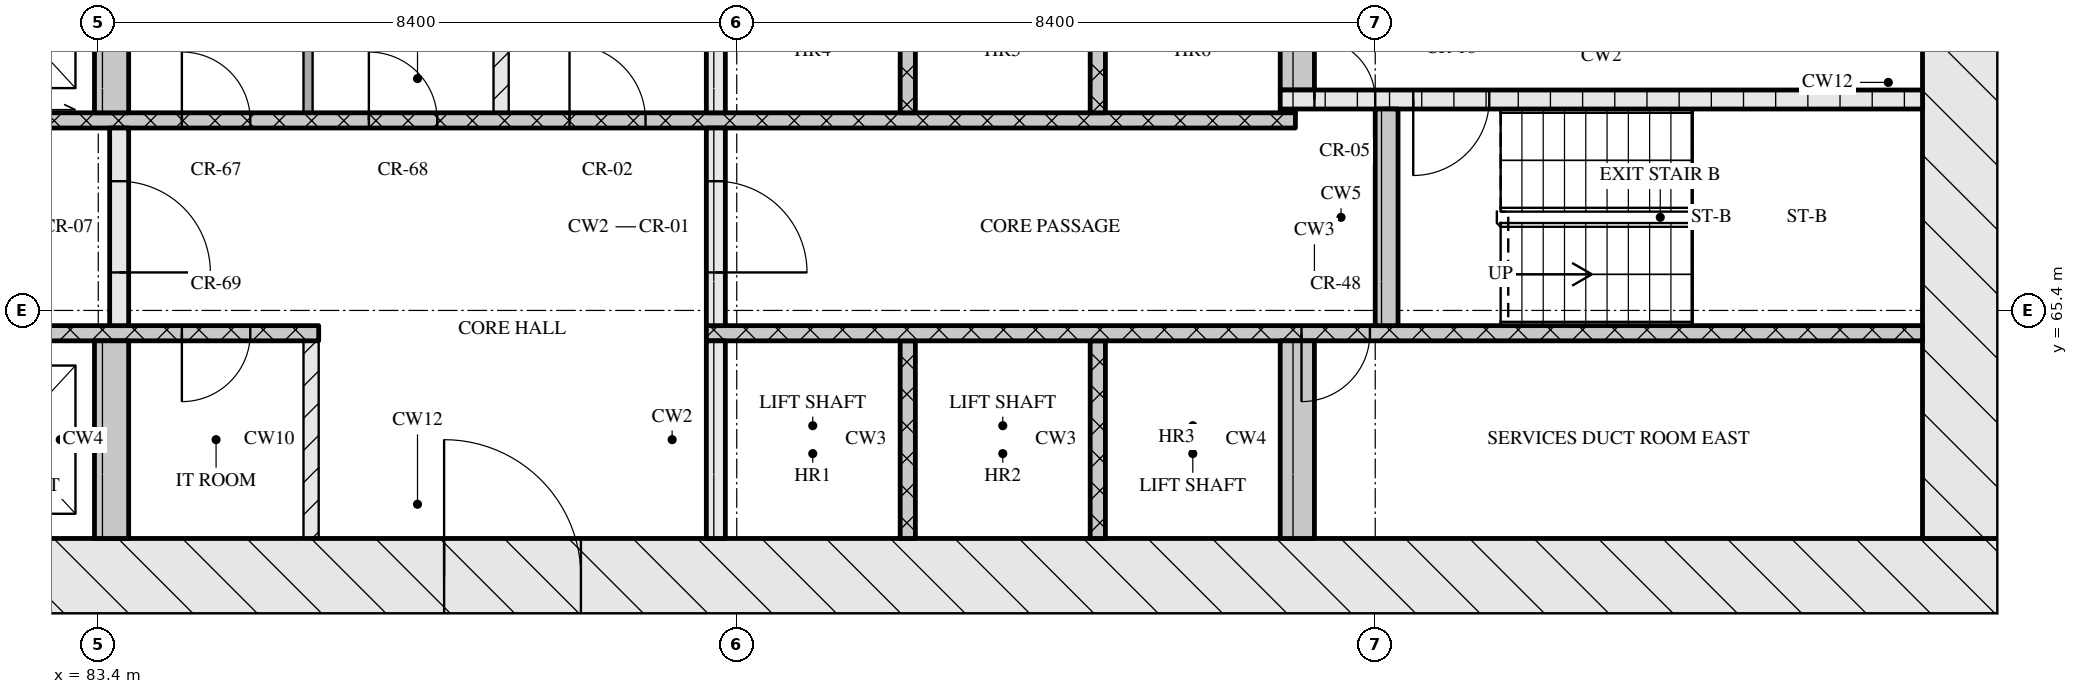
"""IFC4 building model, lengths in metres.
Left out: names, types, materials, properties, quantities, classifications, styles, units other than length and angle.
Written with IfcOpenShell. Run it as: python <this file> out.ifc"""

import sys

from ifc_helpers import new_model, si_unit, direction, frame, frame_2d, origin, place, context, subcontext, project, spatial, rectangle, extrude, element, fill, save


model = new_model("IFC4")
c1 = context("Model", 3, precision=1e-05, world=origin(), true_north=direction((0.0, 1.0)))
c2 = subcontext(c1, "Body", "Model", "MODEL_VIEW")
j1 = project(units=[si_unit("LENGTHUNIT", "METRE"), si_unit("PLANEANGLEUNIT", "RADIAN")], contexts=[c1])
p1 = place(None, origin())
s1 = spatial("IfcSite", under=j1, at=p1, CompositionType="ELEMENT")
p2 = place(p1, origin())
s2 = spatial("IfcBuilding", under=s1, at=p2, CompositionType="ELEMENT")
p3 = place(p2, frame((0.0, 0.0, 98.85)))
s3 = spatial("IfcBuildingStorey", under=s2, at=p3, CompositionType="ELEMENT", Elevation=98.85)
p4 = place(p3, frame((66.8, 61.9, 0.0), z_axis=(0.0, 0.0, 1.0), x_axis=(1.0, 0.0, 0.0)))
e1 = element("IfcWall", 1, at=p4, inside=s3, PredefinedType="SOLIDWALL", context=c2, shape_type="SweptSolid", body=[
    extrude(rectangle(XDim=41.6, YDim=1.0, at=frame_2d((20.8, 0.0))), origin(), (0.0, 0.0, 1.0), 3.32),
])
p5 = place(p4, frame((21.15, 0.0, 0.0)))
e2 = element("IfcOpeningElement", 2, at=p5, cuts=e1, PredefinedType="OPENING", context=c2, shape_type="SweptSolid", body=[
    extrude(rectangle(XDim=1.8, YDim=2.1, at=frame_2d((0.9, 1.05))), frame((0.0, 0.51, 0.0), z_axis=(0.0, -1.0, 0.0), x_axis=(1.0, 0.0, 0.0)), (0.0, 0.0, 1.0), 1.02),
])
p6 = place(p3, frame((107.9, 62.4, 0.0), z_axis=(0.0, 0.0, 1.0), x_axis=(0.0, 1.0, 0.0)))
e3 = element("IfcWall", 3, at=p6, inside=s3, PredefinedType="SOLIDWALL", context=c2, shape_type="SweptSolid", body=[
    extrude(rectangle(XDim=12.0, YDim=1.0, at=frame_2d((6.0, 0.0))), origin(), (0.0, 0.0, 1.0), 3.32),
])
p7 = place(p6, frame((6.45, 0.0, 0.0)))
e4 = element("IfcOpeningElement", 4, at=p7, cuts=e3, PredefinedType="OPENING", context=c2, shape_type="SweptSolid", body=[
    extrude(rectangle(XDim=1.2, YDim=2.1, at=frame_2d((0.6, 1.05))), frame((0.0, 0.51, 0.0), z_axis=(0.0, -1.0, 0.0), x_axis=(1.0, 0.0, 0.0)), (0.0, 0.0, 1.0), 1.02),
])
p8 = place(p3, frame((83.575, 62.4, 0.0), z_axis=(0.0, 0.0, 1.0), x_axis=(0.0, 1.0, 0.0)))
e5 = element("IfcWall", 5, at=p8, inside=s3, PredefinedType="SOLIDWALL", context=c2, shape_type="SweptSolid", body=[
    extrude(rectangle(XDim=2.6, YDim=0.45, at=frame_2d((1.3, 0.0))), origin(), (0.0, 0.0, 1.0), 3.32),
])
p9 = place(p3, frame((86.2, 62.4, 0.0), z_axis=(0.0, 0.0, 1.0), x_axis=(0.0, 1.0, 0.0)))
e6 = element("IfcWall", 6, at=p9, inside=s3, PredefinedType="PARTITIONING", context=c2, shape_type="SweptSolid", body=[
    extrude(rectangle(XDim=2.6, YDim=0.2, at=frame_2d((1.3, 0.0))), origin(), (0.0, 0.0, 1.0), 3.32),
])
p10 = place(p3, frame((91.525, 62.4, 0.0), z_axis=(0.0, 0.0, 1.0), x_axis=(0.0, 1.0, 0.0)))
e7 = element("IfcWall", 7, at=p10, inside=s3, PredefinedType="SOLIDWALL", context=c2, shape_type="SweptSolid", body=[
    extrude(rectangle(XDim=2.6, YDim=0.25, at=frame_2d((1.3, 0.0))), origin(), (0.0, 0.0, 1.0), 3.32),
])
for number, where, z_axis, x_axis in (
    (8, (94.05, 62.4, 0.0), (0.0, 0.0, 1.0), (0.0, 1.0, 0.0)),
    (9, (96.55, 62.4, 0.0), (0.0, 0.0, 1.0), (0.0, 1.0, 0.0)),
):
    element("IfcWall", number, at=place(p3, frame(where, z_axis=z_axis, x_axis=x_axis)), inside=s3, PredefinedType="SOLIDWALL", context=c2, shape_type="SweptSolid", body=[
        extrude(rectangle(XDim=2.6, YDim=0.2, at=frame_2d((1.3, 0.0))), origin(), (0.0, 0.0, 1.0), 3.32),
    ])
p11 = place(p3, frame((99.175, 62.4, 0.0), z_axis=(0.0, 0.0, 1.0), x_axis=(0.0, 1.0, 0.0)))
e10 = element("IfcWall", 10, at=p11, inside=s3, PredefinedType="SOLIDWALL", context=c2, shape_type="SweptSolid", body=[
    extrude(rectangle(XDim=2.6, YDim=0.45, at=frame_2d((1.3, 0.0))), origin(), (0.0, 0.0, 1.0), 3.32),
])
p12 = place(p3, frame((67.8, 65.1, 0.0), z_axis=(0.0, 0.0, 1.0), x_axis=(1.0, 0.0, 0.0)))
e11 = element("IfcWall", 11, at=p12, inside=s3, PredefinedType="SOLIDWALL", context=c2, shape_type="SweptSolid", body=[
    extrude(rectangle(XDim=18.5, YDim=0.2, at=frame_2d((9.25, 0.0))), origin(), (0.0, 0.0, 1.0), 3.32),
])
p13 = place(p12, frame((7.27, 0.0, 0.0)))
e12 = element("IfcOpeningElement", 12, at=p13, cuts=e11, PredefinedType="OPENING", context=c2, shape_type="SweptSolid", body=[
    extrude(rectangle(XDim=0.9, YDim=2.1, at=frame_2d((0.45, 1.05))), frame((0.0, 0.11, 0.0), z_axis=(0.0, -1.0, 0.0), x_axis=(1.0, 0.0, 0.0)), (0.0, 0.0, 1.0), 0.22),
])
p14 = place(p12, frame((8.85, 0.0, 0.0)))
e13 = element("IfcOpeningElement", 13, at=p14, cuts=e11, PredefinedType="OPENING", context=c2, shape_type="SweptSolid", body=[
    extrude(rectangle(XDim=1.1, YDim=2.1, at=frame_2d((0.55, 1.05))), frame((0.0, 0.11, 0.0), z_axis=(0.0, -1.0, 0.0), x_axis=(1.0, 0.0, 0.0)), (0.0, 0.0, 1.0), 0.22),
])
p15 = place(p12, frame((11.35, 0.0, 0.0)))
e14 = element("IfcOpeningElement", 14, at=p15, cuts=e11, PredefinedType="OPENING", context=c2, shape_type="SweptSolid", body=[
    extrude(rectangle(XDim=1.1, YDim=2.1, at=frame_2d((0.55, 1.05))), frame((0.0, 0.11, 0.0), z_axis=(0.0, -1.0, 0.0), x_axis=(1.0, 0.0, 0.0)), (0.0, 0.0, 1.0), 0.22),
])
p16 = place(p12, frame((13.85, 0.0, 0.0)))
e15 = element("IfcOpeningElement", 15, at=p16, cuts=e11, PredefinedType="OPENING", context=c2, shape_type="SweptSolid", body=[
    extrude(rectangle(XDim=1.1, YDim=2.1, at=frame_2d((0.55, 1.05))), frame((0.0, 0.11, 0.0), z_axis=(0.0, -1.0, 0.0), x_axis=(1.0, 0.0, 0.0)), (0.0, 0.0, 1.0), 0.22),
])
p17 = place(p12, frame((16.7, 0.0, 0.0)))
e16 = element("IfcOpeningElement", 16, at=p17, cuts=e11, PredefinedType="OPENING", context=c2, shape_type="SweptSolid", body=[
    extrude(rectangle(XDim=0.9, YDim=2.1, at=frame_2d((0.45, 1.05))), frame((0.0, 0.11, 0.0), z_axis=(0.0, -1.0, 0.0), x_axis=(1.0, 0.0, 0.0)), (0.0, 0.0, 1.0), 0.22),
])
p18 = place(p3, frame((91.4, 65.1, 0.0), z_axis=(0.0, 0.0, 1.0), x_axis=(1.0, 0.0, 0.0)))
e17 = element("IfcWall", 17, at=p18, inside=s3, PredefinedType="SOLIDWALL", context=c2, shape_type="SweptSolid", body=[
    extrude(rectangle(XDim=16.0, YDim=0.2, at=frame_2d((8.0, 0.0))), origin(), (0.0, 0.0, 1.0), 3.32),
])
p19 = place(p18, frame((7.83, 0.0, 0.0)))
e18 = element("IfcOpeningElement", 18, at=p19, cuts=e17, PredefinedType="OPENING", context=c2, shape_type="SweptSolid", body=[
    extrude(rectangle(XDim=0.9, YDim=2.1, at=frame_2d((0.45, 1.05))), frame((0.0, 0.11, 0.0), z_axis=(0.0, -1.0, 0.0), x_axis=(1.0, 0.0, 0.0)), (0.0, 0.0, 1.0), 0.22),
])
p20 = place(p3, frame((83.675, 65.2, 0.0), z_axis=(0.0, 0.0, 1.0), x_axis=(0.0, 1.0, 0.0)))
e19 = element("IfcWall", 19, at=p20, inside=s3, PredefinedType="SOLIDWALL", context=c2, shape_type="SweptSolid", body=[
    extrude(rectangle(XDim=2.6, YDim=0.25, at=frame_2d((1.3, 0.0))), origin(), (0.0, 0.0, 1.0), 3.32),
])
p21 = place(p20, frame((0.7, 0.0, 0.0)))
e20 = element("IfcOpeningElement", 20, at=p21, cuts=e19, PredefinedType="OPENING", context=c2, shape_type="SweptSolid", body=[
    extrude(rectangle(XDim=1.2, YDim=2.1, at=frame_2d((0.6, 1.05))), frame((0.0, 0.135, 0.0), z_axis=(0.0, -1.0, 0.0), x_axis=(1.0, 0.0, 0.0)), (0.0, 0.0, 1.0), 0.27),
])
p22 = place(p3, frame((91.525, 65.2, 0.0), z_axis=(0.0, 0.0, 1.0), x_axis=(0.0, 1.0, 0.0)))
e21 = element("IfcWall", 21, at=p22, inside=s3, PredefinedType="SOLIDWALL", context=c2, shape_type="SweptSolid", body=[
    extrude(rectangle(XDim=2.6, YDim=0.25, at=frame_2d((1.3, 0.0))), origin(), (0.0, 0.0, 1.0), 3.32),
])
p23 = place(p22, frame((0.7, 0.0, 0.0)))
e22 = element("IfcOpeningElement", 22, at=p23, cuts=e21, PredefinedType="OPENING", context=c2, shape_type="SweptSolid", body=[
    extrude(rectangle(XDim=1.2, YDim=2.1, at=frame_2d((0.6, 1.05))), frame((0.0, 0.135, 0.0), z_axis=(0.0, -1.0, 0.0), x_axis=(1.0, 0.0, 0.0)), (0.0, 0.0, 1.0), 0.27),
])
p24 = place(p3, frame((100.35, 65.2, 0.0), z_axis=(0.0, 0.0, 1.0), x_axis=(0.0, 1.0, 0.0)))
e23 = element("IfcWall", 23, at=p24, inside=s3, PredefinedType="SOLIDWALL", context=c2, shape_type="SweptSolid", body=[
    extrude(rectangle(XDim=2.85, YDim=0.3, at=frame_2d((1.425, 0.0))), origin(), (0.0, 0.0, 1.0), 3.32),
])
p25 = place(p3, frame((76.05, 67.9, 0.0), z_axis=(0.0, 0.0, 1.0), x_axis=(1.0, 0.0, 0.0)))
e24 = element("IfcWall", 24, at=p25, inside=s3, PredefinedType="SOLIDWALL", context=c2, shape_type="SweptSolid", body=[
    extrude(rectangle(XDim=23.1, YDim=0.2, at=frame_2d((11.55, 0.0))), origin(), (0.0, 0.0, 1.0), 3.32),
])
p26 = place(p25, frame((0.6, 0.0, 0.0)))
e25 = element("IfcOpeningElement", 25, at=p26, cuts=e24, PredefinedType="OPENING", context=c2, shape_type="SweptSolid", body=[
    extrude(rectangle(XDim=1.1, YDim=2.1, at=frame_2d((0.55, 1.05))), frame((0.0, 0.11, 0.0), z_axis=(0.0, -1.0, 0.0), x_axis=(1.0, 0.0, 0.0)), (0.0, 0.0, 1.0), 0.22),
])
p27 = place(p25, frame((3.1, 0.0, 0.0)))
e26 = element("IfcOpeningElement", 26, at=p27, cuts=e24, PredefinedType="OPENING", context=c2, shape_type="SweptSolid", body=[
    extrude(rectangle(XDim=1.1, YDim=2.1, at=frame_2d((0.55, 1.05))), frame((0.0, 0.11, 0.0), z_axis=(0.0, -1.0, 0.0), x_axis=(1.0, 0.0, 0.0)), (0.0, 0.0, 1.0), 0.22),
])
p28 = place(p25, frame((5.6, 0.0, 0.0)))
e27 = element("IfcOpeningElement", 27, at=p28, cuts=e24, PredefinedType="OPENING", context=c2, shape_type="SweptSolid", body=[
    extrude(rectangle(XDim=1.1, YDim=2.1, at=frame_2d((0.55, 1.05))), frame((0.0, 0.11, 0.0), z_axis=(0.0, -1.0, 0.0), x_axis=(1.0, 0.0, 0.0)), (0.0, 0.0, 1.0), 0.22),
])
p29 = place(p25, frame((8.45, 0.0, 0.0)))
e28 = element("IfcOpeningElement", 28, at=p29, cuts=e24, PredefinedType="OPENING", context=c2, shape_type="SweptSolid", body=[
    extrude(rectangle(XDim=0.9, YDim=2.1, at=frame_2d((0.45, 1.05))), frame((0.0, 0.11, 0.0), z_axis=(0.0, -1.0, 0.0), x_axis=(1.0, 0.0, 0.0)), (0.0, 0.0, 1.0), 0.22),
])
p30 = place(p25, frame((10.91, 0.0, 0.0)))
e29 = element("IfcOpeningElement", 29, at=p30, cuts=e24, PredefinedType="OPENING", context=c2, shape_type="SweptSolid", body=[
    extrude(rectangle(XDim=0.9, YDim=2.1, at=frame_2d((0.45, 1.05))), frame((0.0, 0.11, 0.0), z_axis=(0.0, -1.0, 0.0), x_axis=(1.0, 0.0, 0.0)), (0.0, 0.0, 1.0), 0.22),
])
p31 = place(p25, frame((13.55, 0.0, 0.0)))
e30 = element("IfcOpeningElement", 30, at=p31, cuts=e24, PredefinedType="OPENING", context=c2, shape_type="SweptSolid", body=[
    extrude(rectangle(XDim=1.0, YDim=2.1, at=frame_2d((0.5, 1.05))), frame((0.0, 0.11, 0.0), z_axis=(0.0, -1.0, 0.0), x_axis=(1.0, 0.0, 0.0)), (0.0, 0.0, 1.0), 0.22),
])
p32 = place(p3, frame((83.575, 68.0, 0.0), z_axis=(0.0, 0.0, 1.0), x_axis=(0.0, 1.0, 0.0)))
e31 = element("IfcWall", 31, at=p32, inside=s3, PredefinedType="SOLIDWALL", context=c2, shape_type="SweptSolid", body=[
    extrude(rectangle(XDim=2.6, YDim=0.45, at=frame_2d((1.3, 0.0))), origin(), (0.0, 0.0, 1.0), 3.32),
])
p33 = place(p3, frame((86.16, 68.0, 0.0), z_axis=(0.0, 0.0, 1.0), x_axis=(0.0, 1.0, 0.0)))
e32 = element("IfcWall", 32, at=p33, inside=s3, PredefinedType="PARTITIONING", context=c2, shape_type="SweptSolid", body=[
    extrude(rectangle(XDim=2.6, YDim=0.12, at=frame_2d((1.3, 0.0))), origin(), (0.0, 0.0, 1.0), 3.32),
])
p34 = place(p3, frame((88.7, 68.0, 0.0), z_axis=(0.0, 0.0, 1.0), x_axis=(0.0, 1.0, 0.0)))
e33 = element("IfcWall", 33, at=p34, inside=s3, PredefinedType="PARTITIONING", context=c2, shape_type="SweptSolid", body=[
    extrude(rectangle(XDim=2.6, YDim=0.2, at=frame_2d((1.3, 0.0))), origin(), (0.0, 0.0, 1.0), 3.32),
])
p35 = place(p3, frame((91.525, 68.0, 0.0), z_axis=(0.0, 0.0, 1.0), x_axis=(0.0, 1.0, 0.0)))
e34 = element("IfcWall", 34, at=p35, inside=s3, PredefinedType="SOLIDWALL", context=c2, shape_type="SweptSolid", body=[
    extrude(rectangle(XDim=2.6, YDim=0.25, at=frame_2d((1.3, 0.0))), origin(), (0.0, 0.0, 1.0), 3.32),
])
for number, where, z_axis, x_axis in (
    (35, (94.05, 68.0, 0.0), (0.0, 0.0, 1.0), (0.0, 1.0, 0.0)),
    (36, (96.55, 68.0, 0.0), (0.0, 0.0, 1.0), (0.0, 1.0, 0.0)),
):
    element("IfcWall", number, at=place(p3, frame(where, z_axis=z_axis, x_axis=x_axis)), inside=s3, PredefinedType="SOLIDWALL", context=c2, shape_type="SweptSolid", body=[
        extrude(rectangle(XDim=2.6, YDim=0.2, at=frame_2d((1.3, 0.0))), origin(), (0.0, 0.0, 1.0), 3.32),
    ])
p36 = place(p3, frame((98.95, 68.025, 0.0), z_axis=(0.0, 0.0, 1.0), x_axis=(1.0, 0.0, 0.0)))
e37 = element("IfcWall", 37, at=p36, inside=s3, PredefinedType="SOLIDWALL", context=c2, shape_type="SweptSolid", body=[
    extrude(rectangle(XDim=0.2, YDim=0.05, at=frame_2d((0.1, 0.0))), origin(), (0.0, 0.0, 1.0), 3.32),
])
p37 = place(p3, frame((98.95, 68.175, 0.0), z_axis=(0.0, 0.0, 1.0), x_axis=(1.0, 0.0, 0.0)))
e38 = element("IfcWall", 38, at=p37, inside=s3, PredefinedType="SOLIDWALL", context=c2, shape_type="SweptSolid", body=[
    extrude(rectangle(XDim=8.45, YDim=0.25, at=frame_2d((4.225, 0.0))), origin(), (0.0, 0.0, 1.0), 3.32),
])
p38 = place(p37, frame((0.45, 0.0, 0.0)))
e39 = element("IfcOpeningElement", 39, at=p38, cuts=e38, PredefinedType="OPENING", context=c2, shape_type="SweptSolid", body=[
    extrude(rectangle(XDim=0.8, YDim=2.1, at=frame_2d((0.4, 1.05))), frame((0.0, 0.135, 0.0), z_axis=(0.0, -1.0, 0.0), x_axis=(1.0, 0.0, 0.0)), (0.0, 0.0, 1.0), 0.27),
])
p39 = place(p37, frame((1.75, 0.0, 0.0)))
e40 = element("IfcOpeningElement", 40, at=p39, cuts=e38, PredefinedType="OPENING", context=c2, shape_type="SweptSolid", body=[
    extrude(rectangle(XDim=1.0, YDim=2.1, at=frame_2d((0.5, 1.05))), frame((0.0, 0.135, 0.0), z_axis=(0.0, -1.0, 0.0), x_axis=(1.0, 0.0, 0.0)), (0.0, 0.0, 1.0), 0.27),
])
p40 = place(p3, frame((99.175, 68.3, 0.0), z_axis=(0.0, 0.0, 1.0), x_axis=(0.0, 1.0, 0.0)))
e41 = element("IfcWall", 41, at=p40, inside=s3, PredefinedType="SOLIDWALL", context=c2, shape_type="SweptSolid", body=[
    extrude(rectangle(XDim=2.3, YDim=0.45, at=frame_2d((1.15, 0.0))), origin(), (0.0, 0.0, 1.0), 3.32),
])
p41 = place(p5, origin())
e42 = element("IfcDoor", 42, at=p41, inside=s3, OperationType="DOUBLE_DOOR_SINGLE_SWING", PredefinedType="DOOR", context=c2, shape_type="SweptSolid", body=[
    extrude(rectangle(XDim=1.8, YDim=2.1, at=frame_2d((0.9, 1.05))), frame((0.0, 0.025, 0.0), z_axis=(0.0, -1.0, 0.0), x_axis=(1.0, 0.0, 0.0)), (0.0, 0.0, 1.0), 0.05),
])
fill(e2, e42)
p42 = place(p17, origin())
e43 = element("IfcDoor", 43, at=p42, inside=s3, OperationType="SINGLE_SWING_RIGHT", PredefinedType="DOOR", context=c2, shape_type="SweptSolid", body=[
    extrude(rectangle(XDim=0.9, YDim=2.1, at=frame_2d((0.45, 1.05))), frame((0.0, 0.025, 0.0), z_axis=(0.0, -1.0, 0.0), x_axis=(1.0, 0.0, 0.0)), (0.0, 0.0, 1.0), 0.05),
])
fill(e16, e43)
p43 = place(p19, origin())
e44 = element("IfcDoor", 44, at=p43, inside=s3, OperationType="SINGLE_SWING_RIGHT", PredefinedType="DOOR", context=c2, shape_type="SweptSolid", body=[
    extrude(rectangle(XDim=0.9, YDim=2.1, at=frame_2d((0.45, 1.05))), frame((0.0, 0.025, 0.0), z_axis=(0.0, -1.0, 0.0), x_axis=(1.0, 0.0, 0.0)), (0.0, 0.0, 1.0), 0.05),
])
fill(e18, e44)
p44 = place(p21, origin())
e45 = element("IfcDoor", 45, at=p44, inside=s3, OperationType="SINGLE_SWING_RIGHT", PredefinedType="DOOR", context=c2, shape_type="SweptSolid", body=[
    extrude(rectangle(XDim=1.2, YDim=2.1, at=frame_2d((0.6, 1.05))), frame((0.0, 0.025, 0.0), z_axis=(0.0, -1.0, 0.0), x_axis=(1.0, 0.0, 0.0)), (0.0, 0.0, 1.0), 0.05),
])
fill(e20, e45)
p45 = place(p23, origin())
e46 = element("IfcDoor", 46, at=p45, inside=s3, OperationType="SINGLE_SWING_RIGHT", PredefinedType="DOOR", context=c2, shape_type="SweptSolid", body=[
    extrude(rectangle(XDim=1.2, YDim=2.1, at=frame_2d((0.6, 1.05))), frame((0.0, 0.025, 0.0), z_axis=(0.0, -1.0, 0.0), x_axis=(1.0, 0.0, 0.0)), (0.0, 0.0, 1.0), 0.05),
])
fill(e22, e46)
p46 = place(p29, origin())
e47 = element("IfcDoor", 47, at=p46, inside=s3, OperationType="SINGLE_SWING_LEFT", PredefinedType="DOOR", context=c2, shape_type="SweptSolid", body=[
    extrude(rectangle(XDim=0.9, YDim=2.1, at=frame_2d((0.45, 1.05))), frame((0.0, 0.025, 0.0), z_axis=(0.0, -1.0, 0.0), x_axis=(1.0, 0.0, 0.0)), (0.0, 0.0, 1.0), 0.05),
])
fill(e28, e47)
p47 = place(p30, origin())
e48 = element("IfcDoor", 48, at=p47, inside=s3, OperationType="SINGLE_SWING_LEFT", PredefinedType="DOOR", context=c2, shape_type="SweptSolid", body=[
    extrude(rectangle(XDim=0.9, YDim=2.1, at=frame_2d((0.45, 1.05))), frame((0.0, 0.025, 0.0), z_axis=(0.0, -1.0, 0.0), x_axis=(1.0, 0.0, 0.0)), (0.0, 0.0, 1.0), 0.05),
])
fill(e29, e48)
p48 = place(p31, origin())
e49 = element("IfcDoor", 49, at=p48, inside=s3, OperationType="SINGLE_SWING_LEFT", PredefinedType="DOOR", context=c2, shape_type="SweptSolid", body=[
    extrude(rectangle(XDim=1.0, YDim=2.1, at=frame_2d((0.5, 1.05))), frame((0.0, 0.025, 0.0), z_axis=(0.0, -1.0, 0.0), x_axis=(1.0, 0.0, 0.0)), (0.0, 0.0, 1.0), 0.05),
])
fill(e30, e49)
p49 = place(p38, origin())
e50 = element("IfcDoor", 50, at=p49, inside=s3, OperationType="SINGLE_SWING_LEFT", PredefinedType="DOOR", context=c2, shape_type="SweptSolid", body=[
    extrude(rectangle(XDim=0.8, YDim=2.1, at=frame_2d((0.4, 1.05))), frame((0.0, 0.025, 0.0), z_axis=(0.0, -1.0, 0.0), x_axis=(1.0, 0.0, 0.0)), (0.0, 0.0, 1.0), 0.05),
])
fill(e39, e50)
p50 = place(p39, origin())
e51 = element("IfcDoor", 51, at=p50, inside=s3, OperationType="SINGLE_SWING_RIGHT", PredefinedType="DOOR", context=c2, shape_type="SweptSolid", body=[
    extrude(rectangle(XDim=1.0, YDim=2.1, at=frame_2d((0.5, 1.05))), frame((0.0, 0.025, 0.0), z_axis=(0.0, -1.0, 0.0), x_axis=(1.0, 0.0, 0.0)), (0.0, 0.0, 1.0), 0.05),
])
fill(e40, e51)
save(model, sys.argv[1])
